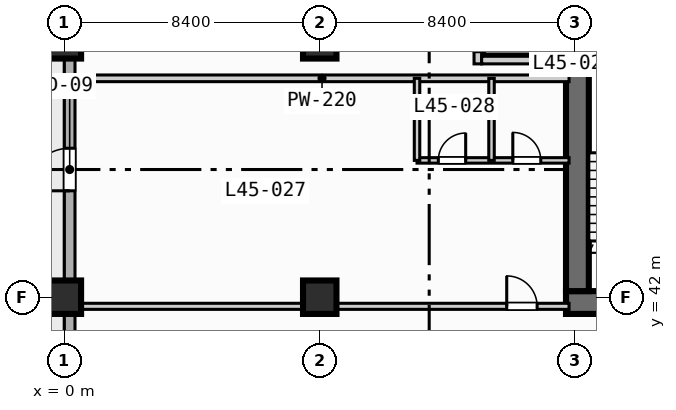
"""IFC4 building model, lengths in metres.
Left out: names, types, materials, properties, quantities, classifications, styles, units other than length and angle.
Written with IfcOpenShell. Run it as: python <this file> out.ifc"""

import sys

from ifc_helpers import new_model, si_unit, direction, frame, frame_2d, origin, origin_2d, place, context, subcontext, project, spatial, rectangle, extrude, element, fill, save


model = new_model("IFC4")
c1 = context("Model", 3, precision=1e-05, world=origin(), true_north=direction((0.0, 1.0)))
c2 = subcontext(c1, "Body", "Model", "MODEL_VIEW")
j1 = project(units=[si_unit("LENGTHUNIT", "METRE"), si_unit("PLANEANGLEUNIT", "RADIAN")], contexts=[c1])
p1 = place(None, origin())
s1 = spatial("IfcSite", under=j1, at=p1, CompositionType="ELEMENT")
p2 = place(p1, origin())
s2 = spatial("IfcBuilding", under=s1, at=p2, CompositionType="ELEMENT")
p3 = place(p2, frame((0.0, 0.0, 186.5)))
s3 = spatial("IfcBuildingStorey", under=s2, at=p3, CompositionType="ELEMENT", Elevation=186.5)
p4 = place(p3, frame((16.5, 41.825, 0.0), z_axis=(0.0, 0.0, 1.0), x_axis=(1.0, 0.0, 0.0)))
e1 = element("IfcWall", 1, at=p4, inside=s3, PredefinedType="SHEAR", context=c2, shape_type="SweptSolid", body=[
    extrude(rectangle(XDim=1.5, YDim=0.75, at=frame_2d((0.75, 0.0))), origin(), (0.0, 0.0, 1.0), 3.47),
])
p5 = place(p3, frame((16.875, 42.2, 0.0), z_axis=(0.0, 0.0, 1.0), x_axis=(0.0, 1.0, 0.0)))
e2 = element("IfcWall", 2, at=p5, inside=s3, PredefinedType="SHEAR", context=c2, shape_type="SweptSolid", body=[
    extrude(rectangle(XDim=16.35, YDim=0.75, at=frame_2d((8.175, 0.0))), origin(), (0.0, 0.0, 1.0), 3.47),
])
for number, where, z_axis, x_axis in (
    (3, (0.0, 42.0, 0.0), (0.0, 0.0, 1.0), (1.0, 0.0, 0.0)),
    (4, (0.0, 50.4, 0.0), (0.0, 0.0, 1.0), (1.0, 0.0, 0.0)),
    (5, (8.4, 42.0, 0.0), (0.0, 0.0, 1.0), (1.0, 0.0, 0.0)),
    (6, (8.4, 50.4, 0.0), (0.0, 0.0, 1.0), (1.0, 0.0, 0.0)),
):
    element("IfcColumn", number, at=place(p3, frame(where, z_axis=z_axis, x_axis=x_axis)), inside=s3, PredefinedType="COLUMN", context=c2, shape_type="SweptSolid", body=[
        extrude(rectangle(XDim=1.1, YDim=1.1, at=origin_2d()), origin(), (0.0, 0.0, 1.0), 3.7),
    ])
p6 = place(p3, frame((0.175, 3.175, 0.0), z_axis=(0.0, 0.0, 1.0), x_axis=(0.0, 1.0, 0.0)))
e7 = element("IfcWall", 7, at=p6, inside=s3, PredefinedType="STANDARD", context=c2, shape_type="SweptSolid", body=[
    extrude(rectangle(XDim=69.25, YDim=0.35, at=frame_2d((34.625, 0.0))), origin(), (0.0, 0.0, 1.0), 3.47),
])
p7 = place(p6, frame((42.325, 0.0, 0.0)))
e8 = element("IfcOpeningElement", 8, at=p7, cuts=e7, PredefinedType="OPENING", context=c2, shape_type="SweptSolid", body=[
    extrude(rectangle(XDim=1.4, YDim=2.2, at=frame_2d((0.7, 1.1))), frame((0.0, 0.185, 0.0), z_axis=(0.0, -1.0, 0.0), x_axis=(1.0, 0.0, 0.0)), (0.0, 0.0, 1.0), 0.37),
])
p8 = place(p6, frame((33.725, 0.0, 0.85)))
e9 = element("IfcOpeningElement", 9, at=p8, cuts=e7, PredefinedType="OPENING", context=c2, shape_type="SweptSolid", body=[
    extrude(rectangle(XDim=1.8, YDim=1.8, at=frame_2d((0.9, 0.9))), frame((0.0, 0.185, 0.0), z_axis=(0.0, -1.0, 0.0), x_axis=(1.0, 0.0, 0.0)), (0.0, 0.0, 1.0), 0.37),
])
p9 = place(p6, frame((18.8, 0.0, 0.85)))
e10 = element("IfcOpeningElement", 10, at=p9, cuts=e7, PredefinedType="OPENING", context=c2, shape_type="SweptSolid", body=[
    extrude(rectangle(XDim=1.8, YDim=1.8, at=frame_2d((0.9, 0.9))), frame((0.0, 0.185, 0.0), z_axis=(0.0, -1.0, 0.0), x_axis=(1.0, 0.0, 0.0)), (0.0, 0.0, 1.0), 0.37),
])
p10 = place(p6, frame((23.15, 0.0, 0.85)))
e11 = element("IfcOpeningElement", 11, at=p10, cuts=e7, PredefinedType="OPENING", context=c2, shape_type="SweptSolid", body=[
    extrude(rectangle(XDim=1.8, YDim=1.8, at=frame_2d((0.9, 0.9))), frame((0.0, 0.185, 0.0), z_axis=(0.0, -1.0, 0.0), x_axis=(1.0, 0.0, 0.0)), (0.0, 0.0, 1.0), 0.37),
])
p11 = place(p6, frame((27.5, 0.0, 0.85)))
e12 = element("IfcOpeningElement", 12, at=p11, cuts=e7, PredefinedType="OPENING", context=c2, shape_type="SweptSolid", body=[
    extrude(rectangle(XDim=1.8, YDim=1.8, at=frame_2d((0.9, 0.9))), frame((0.0, 0.185, 0.0), z_axis=(0.0, -1.0, 0.0), x_axis=(1.0, 0.0, 0.0)), (0.0, 0.0, 1.0), 0.37),
])
p12 = place(p3, frame((13.6, 49.675, 0.0), z_axis=(0.0, 0.0, 1.0), x_axis=(0.0, 1.0, 0.0)))
e13 = element("IfcWall", 13, at=p12, inside=s3, PredefinedType="SOLIDWALL", context=c2, shape_type="SweptSolid", body=[
    extrude(rectangle(XDim=2.75, YDim=0.25, at=frame_2d((1.375, 0.0))), origin(), (0.0, 0.0, 1.0), 3.47),
])
p13 = place(p12, frame((0.4, 0.0, 0.0)))
e14 = element("IfcOpeningElement", 14, at=p13, cuts=e13, PredefinedType="OPENING", context=c2, shape_type="SweptSolid", body=[
    extrude(rectangle(XDim=1.1, YDim=2.15, at=frame_2d((0.55, 1.075))), frame((0.0, 0.135, 0.0), z_axis=(0.0, -1.0, 0.0), x_axis=(1.0, 0.0, 0.0)), (0.0, 0.0, 1.0), 0.27),
])
p14 = place(p3, frame((15.6, 49.675, 0.0), z_axis=(0.0, 0.0, 1.0), x_axis=(0.0, 1.0, 0.0)))
e15 = element("IfcWall", 15, at=p14, inside=s3, PredefinedType="SOLIDWALL", context=c2, shape_type="SweptSolid", body=[
    extrude(rectangle(XDim=2.75, YDim=0.25, at=frame_2d((1.375, 0.0))), origin(), (0.0, 0.0, 1.0), 3.47),
])
p15 = place(p3, frame((13.725, 49.8, 0.0), z_axis=(0.0, 0.0, 1.0), x_axis=(1.0, 0.0, 0.0)))
e16 = element("IfcWall", 16, at=p15, inside=s3, PredefinedType="SOLIDWALL", context=c2, shape_type="SweptSolid", body=[
    extrude(rectangle(XDim=1.75, YDim=0.25, at=frame_2d((0.875, 0.0))), origin(), (0.0, 0.0, 1.0), 3.47),
])
p16 = place(p3, frame((0.35, 41.7, 0.0), z_axis=(0.0, 0.0, 1.0), x_axis=(1.0, 0.0, 0.0)))
e17 = element("IfcWall", 17, at=p16, inside=s3, PredefinedType="PARTITIONING", context=c2, shape_type="SweptSolid", body=[
    extrude(rectangle(XDim=16.25, YDim=0.2, at=frame_2d((8.125, 0.0))), origin(), (0.0, 0.0, 1.0), 2.82),
])
p17 = place(p16, frame((14.2, 0.0, 0.0)))
e18 = element("IfcOpeningElement", 18, at=p17, cuts=e17, PredefinedType="OPENING", context=c2, shape_type="SweptSolid", body=[
    extrude(rectangle(XDim=1.0, YDim=2.15, at=frame_2d((0.5, 1.075))), frame((0.0, 0.11, 0.0), z_axis=(0.0, -1.0, 0.0), x_axis=(1.0, 0.0, 0.0)), (0.0, 0.0, 1.0), 0.22),
])
p18 = place(p3, frame((0.35, 49.2, 0.0), z_axis=(0.0, 0.0, 1.0), x_axis=(1.0, 0.0, 0.0)))
e19 = element("IfcWall", 19, at=p18, inside=s3, PredefinedType="PARTITIONING", context=c2, shape_type="SweptSolid", body=[
    extrude(rectangle(XDim=16.25, YDim=0.22, at=frame_2d((8.125, 0.0))), origin(), (0.0, 0.0, 1.0), 3.47),
])
p19 = place(p3, frame((11.6, 46.5, 0.0), z_axis=(0.0, 0.0, 1.0), x_axis=(1.0, 0.0, 0.0)))
e20 = element("IfcWall", 20, at=p19, inside=s3, PredefinedType="PLUMBINGWALL", context=c2, shape_type="SweptSolid", body=[
    extrude(rectangle(XDim=5.0, YDim=0.18, at=frame_2d((2.5, 0.0))), origin(), (0.0, 0.0, 1.0), 3.47),
])
p20 = place(p19, frame((0.7, 0.0, 0.0)))
e21 = element("IfcOpeningElement", 21, at=p20, cuts=e20, PredefinedType="OPENING", context=c2, shape_type="SweptSolid", body=[
    extrude(rectangle(XDim=0.9, YDim=2.1, at=frame_2d((0.45, 1.05))), frame((0.0, 0.1, 0.0), z_axis=(0.0, -1.0, 0.0), x_axis=(1.0, 0.0, 0.0)), (0.0, 0.0, 1.0), 0.2),
])
p21 = place(p19, frame((3.15, 0.0, 0.0)))
e22 = element("IfcOpeningElement", 22, at=p21, cuts=e20, PredefinedType="OPENING", context=c2, shape_type="SweptSolid", body=[
    extrude(rectangle(XDim=0.92, YDim=2.1, at=frame_2d((0.46, 1.05))), frame((0.0, 0.1, 0.0), z_axis=(0.0, -1.0, 0.0), x_axis=(1.0, 0.0, 0.0)), (0.0, 0.0, 1.0), 0.2),
])
for number, where, z_axis, x_axis in (
    (23, (11.6, 46.5, 0.0), (0.0, 0.0, 1.0), (0.0, 1.0, 0.0)),
    (24, (14.05, 46.5, 0.0), (0.0, 0.0, 1.0), (0.0, 1.0, 0.0)),
):
    element("IfcWall", number, at=place(p3, frame(where, z_axis=z_axis, x_axis=x_axis)), inside=s3, PredefinedType="PLUMBINGWALL", context=c2, shape_type="SweptSolid", body=[
        extrude(rectangle(XDim=2.7, YDim=0.18, at=frame_2d((1.35, 0.0))), origin(), (0.0, 0.0, 1.0), 3.47),
    ])
p22 = place(p7, origin())
e25 = element("IfcDoor", 25, at=p22, inside=s3, OperationType="SINGLE_SWING_LEFT", PredefinedType="DOOR", context=c2, shape_type="SweptSolid", body=[
    extrude(rectangle(XDim=1.4, YDim=2.2, at=frame_2d((0.7, 1.1))), frame((0.0, 0.025, 0.0), z_axis=(0.0, -1.0, 0.0), x_axis=(1.0, 0.0, 0.0)), (0.0, 0.0, 1.0), 0.05),
])
fill(e8, e25)
p23 = place(p17, origin())
e26 = element("IfcDoor", 26, at=p23, inside=s3, OperationType="SINGLE_SWING_LEFT", PredefinedType="DOOR", context=c2, shape_type="SweptSolid", body=[
    extrude(rectangle(XDim=1.0, YDim=2.15, at=frame_2d((0.5, 1.075))), frame((0.0, 0.025, 0.0), z_axis=(0.0, -1.0, 0.0), x_axis=(1.0, 0.0, 0.0)), (0.0, 0.0, 1.0), 0.05),
])
fill(e18, e26)
p24 = place(p20, origin())
e27 = element("IfcDoor", 27, at=p24, inside=s3, OperationType="SINGLE_SWING_RIGHT", PredefinedType="DOOR", context=c2, shape_type="SweptSolid", body=[
    extrude(rectangle(XDim=0.9, YDim=2.1, at=frame_2d((0.45, 1.05))), frame((0.0, 0.025, 0.0), z_axis=(0.0, -1.0, 0.0), x_axis=(1.0, 0.0, 0.0)), (0.0, 0.0, 1.0), 0.05),
])
fill(e21, e27)
p25 = place(p21, origin())
e28 = element("IfcDoor", 28, at=p25, inside=s3, OperationType="SINGLE_SWING_LEFT", PredefinedType="DOOR", context=c2, shape_type="SweptSolid", body=[
    extrude(rectangle(XDim=0.92, YDim=2.1, at=frame_2d((0.46, 1.05))), frame((0.0, 0.025, 0.0), z_axis=(0.0, -1.0, 0.0), x_axis=(1.0, 0.0, 0.0)), (0.0, 0.0, 1.0), 0.05),
])
fill(e22, e28)
save(model, sys.argv[1])
